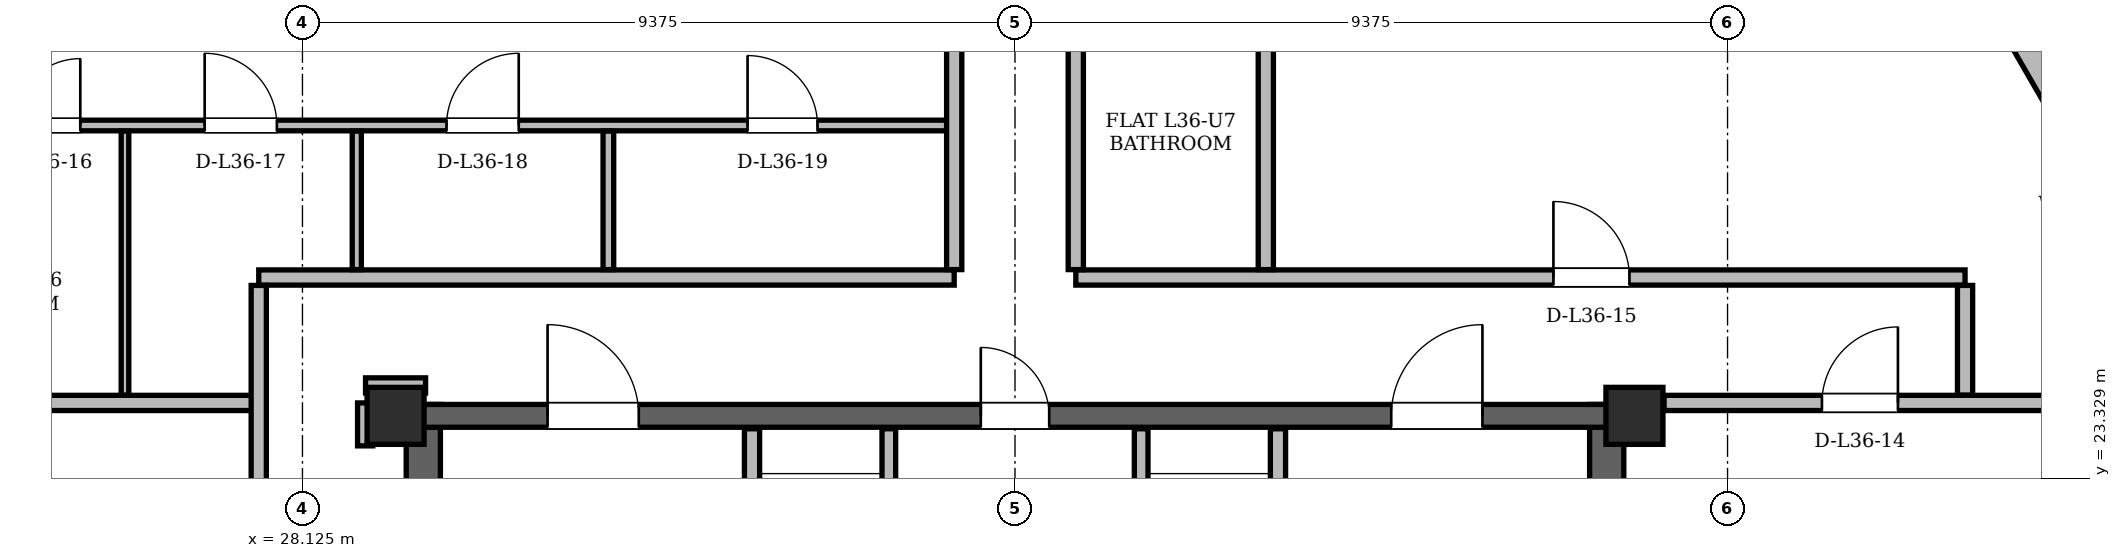
"""IFC4 building model, lengths in metres.
Left out: names, types, materials, properties, quantities, classifications, styles, units other than length and angle.
Written with IfcOpenShell. Run it as: python <this file> out.ifc"""

import sys

from ifc_helpers import new_model, si_unit, direction, frame, frame_2d, origin, origin_2d, place, context, subcontext, project, spatial, rectangle, hollow_rectangle, extrude, element, fill, save


model = new_model("IFC4")
c1 = context("Model", 3, precision=1e-05, world=origin(), true_north=direction((0.0, 1.0)))
c2 = subcontext(c1, "Body", "Model", "MODEL_VIEW")
j1 = project(units=[si_unit("LENGTHUNIT", "METRE"), si_unit("PLANEANGLEUNIT", "RADIAN")], contexts=[c1])
p1 = place(None, origin())
s1 = spatial("IfcSite", under=j1, at=p1, CompositionType="ELEMENT")
p2 = place(p1, origin())
s2 = spatial("IfcBuilding", under=s1, at=p2, CompositionType="ELEMENT")
p3 = place(p2, frame((0.0, 0.0, 138.6)))
s3 = spatial("IfcBuildingStorey", under=s2, at=p3, CompositionType="ELEMENT", Elevation=138.6)
for number, where, z_axis, x_axis in (
    (1, (45.65, 24.15, 0.0), (0.0, 0.0, 1.0), (1.0, 0.0, 0.0)),
    (2, (29.35, 24.15, 0.0), (0.0, 0.0, 1.0), (1.0, 0.0, 0.0)),
):
    element("IfcColumn", number, at=place(p3, frame(where, z_axis=z_axis, x_axis=x_axis)), inside=s3, PredefinedType="COLUMN", context=c2, shape_type="SweptSolid", body=[
        extrude(hollow_rectangle(XDim=0.75, YDim=0.75, WallThickness=0.06, at=origin_2d()), origin(), (0.0, 0.0, 1.0), 3.6),
    ])
for number, where, z_axis, x_axis in (
    (3, (29.715, 11.0, 0.0), (0.0, 0.0, 1.0), (0.0, 1.0, 0.0)),
    (4, (45.285, 11.0, 0.0), (0.0, 0.0, 1.0), (0.0, 1.0, 0.0)),
):
    element("IfcWall", number, at=place(p3, frame(where, z_axis=z_axis, x_axis=x_axis)), inside=s3, PredefinedType="SHEAR", context=c2, shape_type="SweptSolid", body=[
        extrude(rectangle(XDim=13.3, YDim=0.45, at=frame_2d((6.65, 0.0))), origin(), (0.0, 0.0, 1.0), 3.36),
    ])
p4 = place(p3, frame((29.65, 24.15, 0.0), z_axis=(0.0, 0.0, 1.0), x_axis=(1.0, 0.0, 0.0)))
e5 = element("IfcWall", 5, at=p4, inside=s3, PredefinedType="SHEAR", context=c2, shape_type="SweptSolid", body=[
    extrude(rectangle(XDim=15.7, YDim=0.3, at=frame_2d((7.85, 0.0))), origin(), (0.0, 0.0, 1.0), 3.36),
])
p5 = place(p4, frame((1.7, 0.0, 0.0)))
e6 = element("IfcOpeningElement", 6, at=p5, cuts=e5, PredefinedType="OPENING", context=c2, shape_type="SweptSolid", body=[
    extrude(rectangle(XDim=1.2, YDim=2.2, at=frame_2d((0.6, 1.1))), frame((0.0, 0.15, 0.0), z_axis=(0.0, -1.0, 0.0), x_axis=(1.0, 0.0, 0.0)), (0.0, 0.0, 1.0), 0.3),
])
p6 = place(p4, frame((12.8, 0.0, 0.0)))
e7 = element("IfcOpeningElement", 7, at=p6, cuts=e5, PredefinedType="OPENING", context=c2, shape_type="SweptSolid", body=[
    extrude(rectangle(XDim=1.2, YDim=2.2, at=frame_2d((0.6, 1.1))), frame((0.0, 0.15, 0.0), z_axis=(0.0, -1.0, 0.0), x_axis=(1.0, 0.0, 0.0)), (0.0, 0.0, 1.0), 0.3),
])
p7 = place(p4, frame((7.4, 0.0, 0.0)))
e8 = element("IfcOpeningElement", 8, at=p7, cuts=e5, PredefinedType="OPENING", context=c2, shape_type="SweptSolid", body=[
    extrude(rectangle(XDim=0.9, YDim=2.05, at=frame_2d((0.45, 1.025))), frame((0.0, 0.15, 0.0), z_axis=(0.0, -1.0, 0.0), x_axis=(1.0, 0.0, 0.0)), (0.0, 0.0, 1.0), 0.3),
])
p8 = place(p3, frame((60.155, 12.82, 0.0), z_axis=(0.0, 0.0, 1.0), x_axis=(-0.499998325337, 0.86602637065, 0.0)))
e9 = element("IfcWall", 9, at=p8, inside=s3, PredefinedType="SOLIDWALL", context=c2, shape_type="SweptSolid", body=[
    extrude(rectangle(XDim=35.264, YDim=0.34, at=frame_2d((17.632, 0.0))), origin(), (0.0, 0.0, 1.0), 2.58),
])
p9 = place(p8, frame((6.579, 0.0, 0.0)))
e10 = element("IfcOpeningElement", 10, at=p9, cuts=e9, PredefinedType="OPENING", context=c2, shape_type="SweptSolid", body=[
    extrude(rectangle(XDim=1.5, YDim=2.2, at=frame_2d((0.75, 1.1))), frame((0.0, 0.17, 0.0), z_axis=(0.0, -1.0, 0.0), x_axis=(1.0, 0.0, 0.0)), (0.0, 0.0, 1.0), 0.34),
])
p10 = place(p8, frame((25.73, 0.0, 0.0)))
e11 = element("IfcOpeningElement", 11, at=p10, cuts=e9, PredefinedType="OPENING", context=c2, shape_type="SweptSolid", body=[
    extrude(rectangle(XDim=1.5, YDim=2.2, at=frame_2d((0.75, 1.1))), frame((0.0, 0.17, 0.0), z_axis=(0.0, -1.0, 0.0), x_axis=(1.0, 0.0, 0.0)), (0.0, 0.0, 1.0), 0.34),
])
p11 = place(p8, frame((3.541, 0.0, 0.85)))
e12 = element("IfcOpeningElement", 12, at=p11, cuts=e9, PredefinedType="OPENING", context=c2, shape_type="SweptSolid", body=[
    extrude(rectangle(XDim=1.2, YDim=1.48, at=frame_2d((0.6, 0.74))), frame((0.0, 0.17, 0.0), z_axis=(0.0, -1.0, 0.0), x_axis=(1.0, 0.0, 0.0)), (0.0, 0.0, 1.0), 0.34),
])
p12 = place(p8, frame((11.719, 0.0, 0.85)))
e13 = element("IfcOpeningElement", 13, at=p12, cuts=e9, PredefinedType="OPENING", context=c2, shape_type="SweptSolid", body=[
    extrude(rectangle(XDim=1.2, YDim=1.48, at=frame_2d((0.6, 0.74))), frame((0.0, 0.17, 0.0), z_axis=(0.0, -1.0, 0.0), x_axis=(1.0, 0.0, 0.0)), (0.0, 0.0, 1.0), 0.34),
])
p13 = place(p8, frame((15.189, 0.0, 0.85)))
e14 = element("IfcOpeningElement", 14, at=p13, cuts=e9, PredefinedType="OPENING", context=c2, shape_type="SweptSolid", body=[
    extrude(rectangle(XDim=2.8, YDim=1.62, at=frame_2d((1.4, 0.81))), frame((0.0, 0.17, 0.0), z_axis=(0.0, -1.0, 0.0), x_axis=(1.0, 0.0, 0.0)), (0.0, 0.0, 1.0), 0.34),
])
p14 = place(p8, frame((32.147, 0.0, 0.85)))
e15 = element("IfcOpeningElement", 15, at=p14, cuts=e9, PredefinedType="OPENING", context=c2, shape_type="SweptSolid", body=[
    extrude(rectangle(XDim=2.0, YDim=1.62, at=frame_2d((1.0, 0.81))), frame((0.0, 0.17, 0.0), z_axis=(0.0, -1.0, 0.0), x_axis=(1.0, 0.0, 0.0)), (0.0, 0.0, 1.0), 0.34),
])
p15 = place(p3, frame((32.478, 43.36, 0.0), z_axis=(0.0, 0.0, 1.0), x_axis=(-0.499998325337, -0.86602637065, 0.0)))
e16 = element("IfcWall", 16, at=p15, inside=s3, PredefinedType="SOLIDWALL", context=c2, shape_type="SweptSolid", body=[
    extrude(rectangle(XDim=35.264, YDim=0.34, at=frame_2d((17.632, 0.0))), origin(), (0.0, 0.0, 1.0), 2.58),
])
p16 = place(p15, frame((6.579, 0.0, 0.0)))
e17 = element("IfcOpeningElement", 17, at=p16, cuts=e16, PredefinedType="OPENING", context=c2, shape_type="SweptSolid", body=[
    extrude(rectangle(XDim=1.5, YDim=2.2, at=frame_2d((0.75, 1.1))), frame((0.0, 0.17, 0.0), z_axis=(0.0, -1.0, 0.0), x_axis=(1.0, 0.0, 0.0)), (0.0, 0.0, 1.0), 0.34),
])
p17 = place(p15, frame((26.36, 0.0, 0.0)))
e18 = element("IfcOpeningElement", 18, at=p17, cuts=e16, PredefinedType="OPENING", context=c2, shape_type="SweptSolid", body=[
    extrude(rectangle(XDim=1.5, YDim=2.2, at=frame_2d((0.75, 1.1))), frame((0.0, 0.17, 0.0), z_axis=(0.0, -1.0, 0.0), x_axis=(1.0, 0.0, 0.0)), (0.0, 0.0, 1.0), 0.34),
])
p18 = place(p15, frame((22.175, 0.0, 0.85)))
e19 = element("IfcOpeningElement", 19, at=p18, cuts=e16, PredefinedType="OPENING", context=c2, shape_type="SweptSolid", body=[
    extrude(rectangle(XDim=1.2, YDim=1.48, at=frame_2d((0.6, 0.74))), frame((0.0, 0.17, 0.0), z_axis=(0.0, -1.0, 0.0), x_axis=(1.0, 0.0, 0.0)), (0.0, 0.0, 1.0), 0.34),
])
p19 = place(p15, frame((2.32, 0.0, 0.85)))
e20 = element("IfcOpeningElement", 20, at=p19, cuts=e16, PredefinedType="OPENING", context=c2, shape_type="SweptSolid", body=[
    extrude(rectangle(XDim=1.6, YDim=1.62, at=frame_2d((0.8, 0.81))), frame((0.0, 0.17, 0.0), z_axis=(0.0, -1.0, 0.0), x_axis=(1.0, 0.0, 0.0)), (0.0, 0.0, 1.0), 0.34),
])
p20 = place(p15, frame((12.967, 0.0, 0.85)))
e21 = element("IfcOpeningElement", 21, at=p20, cuts=e16, PredefinedType="OPENING", context=c2, shape_type="SweptSolid", body=[
    extrude(rectangle(XDim=3.0, YDim=1.62, at=frame_2d((1.5, 0.81))), frame((0.0, 0.17, 0.0), z_axis=(0.0, -1.0, 0.0), x_axis=(1.0, 0.0, 0.0)), (0.0, 0.0, 1.0), 0.34),
])
p21 = place(p15, frame((20.304, 0.0, 0.85)))
e22 = element("IfcOpeningElement", 22, at=p21, cuts=e16, PredefinedType="OPENING", context=c2, shape_type="SweptSolid", body=[
    extrude(rectangle(XDim=1.2, YDim=1.48, at=frame_2d((0.6, 0.74))), frame((0.0, 0.17, 0.0), z_axis=(0.0, -1.0, 0.0), x_axis=(1.0, 0.0, 0.0)), (0.0, 0.0, 1.0), 0.34),
])
p22 = place(p3, frame((34.04, 19.48, 0.0), z_axis=(0.0, 0.0, 1.0), x_axis=(0.0, 1.0, 0.0)))
e23 = element("IfcWall", 23, at=p22, inside=s3, PredefinedType="PARTITIONING", context=c2, shape_type="SweptSolid", body=[
    extrude(rectangle(XDim=4.5, YDim=0.2, at=frame_2d((2.25, 0.0))), origin(), (0.0, 0.0, 1.0), 2.4),
])
p23 = place(p22, frame((2.12, 0.0, 0.0)))
e24 = element("IfcOpeningElement", 24, at=p23, cuts=e23, PredefinedType="OPENING", context=c2, shape_type="SweptSolid", body=[
    extrude(rectangle(XDim=1.1, YDim=2.2, at=frame_2d((0.55, 1.1))), frame((0.0, 0.1, 0.0), z_axis=(0.0, -1.0, 0.0), x_axis=(1.0, 0.0, 0.0)), (0.0, 0.0, 1.0), 0.2),
])
p24 = place(p3, frame((35.84, 20.96, 0.0), z_axis=(0.0, 0.0, 1.0), x_axis=(0.0, 1.0, 0.0)))
e25 = element("IfcWall", 25, at=p24, inside=s3, PredefinedType="PARTITIONING", context=c2, shape_type="SweptSolid", body=[
    extrude(rectangle(XDim=3.02, YDim=0.18, at=frame_2d((1.51, 0.0))), origin(), (0.0, 0.0, 1.0), 2.4),
])
p25 = place(p3, frame((40.96, 19.48, 0.0), z_axis=(0.0, 0.0, 1.0), x_axis=(0.0, 1.0, 0.0)))
e26 = element("IfcWall", 26, at=p25, inside=s3, PredefinedType="PARTITIONING", context=c2, shape_type="SweptSolid", body=[
    extrude(rectangle(XDim=4.5, YDim=0.2, at=frame_2d((2.25, 0.0))), origin(), (0.0, 0.0, 1.0), 2.4),
])
p26 = place(p25, frame((2.12, 0.0, 0.0)))
e27 = element("IfcOpeningElement", 27, at=p26, cuts=e26, PredefinedType="OPENING", context=c2, shape_type="SweptSolid", body=[
    extrude(rectangle(XDim=1.1, YDim=2.2, at=frame_2d((0.55, 1.1))), frame((0.0, 0.1, 0.0), z_axis=(0.0, -1.0, 0.0), x_axis=(1.0, 0.0, 0.0)), (0.0, 0.0, 1.0), 0.2),
])
p27 = place(p3, frame((39.16, 20.96, 0.0), z_axis=(0.0, 0.0, 1.0), x_axis=(0.0, 1.0, 0.0)))
e28 = element("IfcWall", 28, at=p27, inside=s3, PredefinedType="PARTITIONING", context=c2, shape_type="SweptSolid", body=[
    extrude(rectangle(XDim=3.02, YDim=0.18, at=frame_2d((1.51, 0.0))), origin(), (0.0, 0.0, 1.0), 2.4),
])
p28 = place(p3, frame((21.686, 24.32, 0.0), z_axis=(0.0, 0.0, 1.0), x_axis=(1.0, 0.0, 0.0)))
e29 = element("IfcWall", 29, at=p28, inside=s3, PredefinedType="PARTITIONING", context=c2, shape_type="SweptSolid", body=[
    extrude(rectangle(XDim=5.864, YDim=0.2, at=frame_2d((2.932, 0.0))), origin(), (0.0, 0.0, 1.0), 3.36),
])
p29 = place(p3, frame((46.04, 24.32, 0.0), z_axis=(0.0, 0.0, 1.0), x_axis=(1.0, 0.0, 0.0)))
e30 = element("IfcWall", 30, at=p29, inside=s3, PredefinedType="PARTITIONING", context=c2, shape_type="SweptSolid", body=[
    extrude(rectangle(XDim=7.274, YDim=0.2, at=frame_2d((3.637, 0.0))), origin(), (0.0, 0.0, 1.0), 3.36),
])
p30 = place(p29, frame((2.077, 0.0, 0.0)))
e31 = element("IfcOpeningElement", 31, at=p30, cuts=e30, PredefinedType="OPENING", context=c2, shape_type="SweptSolid", body=[
    extrude(rectangle(XDim=1.0, YDim=2.18, at=frame_2d((0.5, 1.09))), frame((0.0, 0.1, 0.0), z_axis=(0.0, -1.0, 0.0), x_axis=(1.0, 0.0, 0.0)), (0.0, 0.0, 1.0), 0.2),
])
p31 = place(p3, frame((28.955, 24.55, 0.0), z_axis=(0.0, 0.0, 1.0), x_axis=(1.0, 0.0, 0.0)))
e32 = element("IfcWall", 32, at=p31, inside=s3, PredefinedType="PARTITIONING", context=c2, shape_type="SweptSolid", body=[
    extrude(rectangle(XDim=0.79, YDim=0.2, at=frame_2d((0.395, 0.0))), origin(), (0.0, 0.0, 1.0), 2.822),
])
p32 = place(p3, frame((27.55, 25.97, 0.0), z_axis=(0.0, 0.0, 1.0), x_axis=(1.0, 0.0, 0.0)))
e33 = element("IfcWall", 33, at=p32, inside=s3, PredefinedType="PARTITIONING", context=c2, shape_type="SweptSolid", body=[
    extrude(rectangle(XDim=9.15, YDim=0.2, at=frame_2d((4.575, 0.0))), origin(), (0.0, 0.0, 1.0), 2.822),
])
p33 = place(p3, frame((38.3, 25.97, 0.0), z_axis=(0.0, 0.0, 1.0), x_axis=(1.0, 0.0, 0.0)))
e34 = element("IfcWall", 34, at=p33, inside=s3, PredefinedType="PARTITIONING", context=c2, shape_type="SweptSolid", body=[
    extrude(rectangle(XDim=11.7, YDim=0.2, at=frame_2d((5.85, 0.0))), origin(), (0.0, 0.0, 1.0), 2.822),
])
p34 = place(p33, frame((6.284, 0.0, 0.0)))
e35 = element("IfcOpeningElement", 35, at=p34, cuts=e34, PredefinedType="OPENING", context=c2, shape_type="SweptSolid", body=[
    extrude(rectangle(XDim=1.0, YDim=2.18, at=frame_2d((0.5, 1.09))), frame((0.0, 0.1, 0.0), z_axis=(0.0, -1.0, 0.0), x_axis=(1.0, 0.0, 0.0)), (0.0, 0.0, 1.0), 0.2),
])
p35 = place(p3, frame((23.793, 27.97, 0.0), z_axis=(0.0, 0.0, 1.0), x_axis=(1.0, 0.0, 0.0)))
e36 = element("IfcWall", 36, at=p35, inside=s3, PredefinedType="PARTITIONING", context=c2, shape_type="SweptSolid", body=[
    extrude(rectangle(XDim=12.957, YDim=0.14, at=frame_2d((6.478, 0.0))), origin(), (0.0, 0.0, 1.0), 2.822),
])
p36 = place(p35, frame((0.529, 0.0, 0.0)))
e37 = element("IfcOpeningElement", 37, at=p36, cuts=e36, PredefinedType="OPENING", context=c2, shape_type="SweptSolid", body=[
    extrude(rectangle(XDim=0.88, YDim=2.08, at=frame_2d((0.44, 1.04))), frame((0.0, 0.07, 0.0), z_axis=(0.0, -1.0, 0.0), x_axis=(1.0, 0.0, 0.0)), (0.0, 0.0, 1.0), 0.14),
])
p37 = place(p35, frame((3.045, 0.0, 0.0)))
e38 = element("IfcOpeningElement", 38, at=p37, cuts=e36, PredefinedType="OPENING", context=c2, shape_type="SweptSolid", body=[
    extrude(rectangle(XDim=0.95, YDim=2.1, at=frame_2d((0.475, 1.05))), frame((0.0, 0.07, 0.0), z_axis=(0.0, -1.0, 0.0), x_axis=(1.0, 0.0, 0.0)), (0.0, 0.0, 1.0), 0.14),
])
p38 = place(p35, frame((6.227, 0.0, 0.0)))
e39 = element("IfcOpeningElement", 39, at=p38, cuts=e36, PredefinedType="OPENING", context=c2, shape_type="SweptSolid", body=[
    extrude(rectangle(XDim=0.95, YDim=2.1, at=frame_2d((0.475, 1.05))), frame((0.0, 0.07, 0.0), z_axis=(0.0, -1.0, 0.0), x_axis=(1.0, 0.0, 0.0)), (0.0, 0.0, 1.0), 0.14),
])
p39 = place(p35, frame((10.188, 0.0, 0.0)))
e40 = element("IfcOpeningElement", 40, at=p39, cuts=e36, PredefinedType="OPENING", context=c2, shape_type="SweptSolid", body=[
    extrude(rectangle(XDim=0.92, YDim=2.12, at=frame_2d((0.46, 1.06))), frame((0.0, 0.07, 0.0), z_axis=(0.0, -1.0, 0.0), x_axis=(1.0, 0.0, 0.0)), (0.0, 0.0, 1.0), 0.14),
])
p40 = place(p3, frame((25.79, 24.424, 0.0), z_axis=(0.0, 0.0, 1.0), x_axis=(0.0, 1.0, 0.0)))
e41 = element("IfcWall", 41, at=p40, inside=s3, PredefinedType="PARTITIONING", context=c2, shape_type="SweptSolid", body=[
    extrude(rectangle(XDim=3.472, YDim=0.1, at=frame_2d((1.736, 0.0))), origin(), (0.0, 0.0, 1.0), 3.36),
])
p41 = place(p3, frame((27.55, 18.554, 0.0), z_axis=(0.0, 0.0, 1.0), x_axis=(0.0, 1.0, 0.0)))
e42 = element("IfcWall", 42, at=p41, inside=s3, PredefinedType="PARTITIONING", context=c2, shape_type="SweptSolid", body=[
    extrude(rectangle(XDim=7.312, YDim=0.2, at=frame_2d((3.656, 0.0))), origin(), (0.0, 0.0, 1.0), 3.36),
])
p42 = place(p3, frame((28.84, 26.074, 0.0), z_axis=(0.0, 0.0, 1.0), x_axis=(0.0, 1.0, 0.0)))
e43 = element("IfcWall", 43, at=p42, inside=s3, PredefinedType="PARTITIONING", context=c2, shape_type="SweptSolid", body=[
    extrude(rectangle(XDim=1.822, YDim=0.12, at=frame_2d((0.911, 0.0))), origin(), (0.0, 0.0, 1.0), 3.36),
])
p43 = place(p3, frame((28.95, 23.755, 0.0), z_axis=(0.0, 0.0, 1.0), x_axis=(0.0, 1.0, 0.0)))
e44 = element("IfcWall", 44, at=p43, inside=s3, PredefinedType="PARTITIONING", context=c2, shape_type="SweptSolid", body=[
    extrude(rectangle(XDim=0.565, YDim=0.2, at=frame_2d((0.283, 0.0))), origin(), (0.0, 0.0, 1.0), 3.36),
])
p44 = place(p3, frame((32.15, 26.074, 0.0), z_axis=(0.0, 0.0, 1.0), x_axis=(0.0, 1.0, 0.0)))
e45 = element("IfcWall", 45, at=p44, inside=s3, PredefinedType="PARTITIONING", context=c2, shape_type="SweptSolid", body=[
    extrude(rectangle(XDim=1.822, YDim=0.14, at=frame_2d((0.911, 0.0))), origin(), (0.0, 0.0, 1.0), 3.36),
])
p45 = place(p3, frame((36.7, 26.074, 0.0), z_axis=(0.0, 0.0, 1.0), x_axis=(0.0, 1.0, 0.0)))
e46 = element("IfcWall", 46, at=p45, inside=s3, PredefinedType="PARTITIONING", context=c2, shape_type="SweptSolid", body=[
    extrude(rectangle(XDim=17.112, YDim=0.2, at=frame_2d((8.556, 0.0))), origin(), (0.0, 0.0, 1.0), 3.36),
])
p46 = place(p45, frame((7.042, 0.0, 0.0)))
e47 = element("IfcOpeningElement", 47, at=p46, cuts=e46, PredefinedType="OPENING", context=c2, shape_type="SweptSolid", body=[
    extrude(rectangle(XDim=1.0, YDim=2.18, at=frame_2d((0.5, 1.09))), frame((0.0, 0.1, 0.0), z_axis=(0.0, -1.0, 0.0), x_axis=(1.0, 0.0, 0.0)), (0.0, 0.0, 1.0), 0.2),
])
p47 = place(p3, frame((38.3, 26.074, 0.0), z_axis=(0.0, 0.0, 1.0), x_axis=(0.0, 1.0, 0.0)))
e48 = element("IfcWall", 48, at=p47, inside=s3, PredefinedType="PARTITIONING", context=c2, shape_type="SweptSolid", body=[
    extrude(rectangle(XDim=13.422, YDim=0.2, at=frame_2d((6.711, 0.0))), origin(), (0.0, 0.0, 1.0), 3.36),
])
p48 = place(p47, frame((8.678, 0.0, 0.0)))
e49 = element("IfcOpeningElement", 49, at=p48, cuts=e48, PredefinedType="OPENING", context=c2, shape_type="SweptSolid", body=[
    extrude(rectangle(XDim=1.0, YDim=2.18, at=frame_2d((0.5, 1.09))), frame((0.0, 0.1, 0.0), z_axis=(0.0, -1.0, 0.0), x_axis=(1.0, 0.0, 0.0)), (0.0, 0.0, 1.0), 0.2),
])
p49 = place(p3, frame((40.8, 26.074, 0.0), z_axis=(0.0, 0.0, 1.0), x_axis=(0.0, 1.0, 0.0)))
e50 = element("IfcWall", 50, at=p49, inside=s3, PredefinedType="PARTITIONING", context=c2, shape_type="SweptSolid", body=[
    extrude(rectangle(XDim=17.112, YDim=0.2, at=frame_2d((8.556, 0.0))), origin(), (0.0, 0.0, 1.0), 3.36),
])
p50 = place(p3, frame((50.0, 24.424, 0.0), z_axis=(0.0, 0.0, 1.0), x_axis=(0.0, 1.0, 0.0)))
e51 = element("IfcWall", 51, at=p50, inside=s3, PredefinedType="PARTITIONING", context=c2, shape_type="SweptSolid", body=[
    extrude(rectangle(XDim=1.442, YDim=0.2, at=frame_2d((0.721, 0.0))), origin(), (0.0, 0.0, 1.0), 3.36),
])
p51 = place(p5, origin())
e52 = element("IfcDoor", 52, at=p51, inside=s3, OperationType="SINGLE_SWING_LEFT", PredefinedType="DOOR", context=c2, shape_type="SweptSolid", body=[
    extrude(rectangle(XDim=1.2, YDim=2.2, at=frame_2d((0.6, 1.1))), frame((0.0, 0.025, 0.0), z_axis=(0.0, -1.0, 0.0), x_axis=(1.0, 0.0, 0.0)), (0.0, 0.0, 1.0), 0.05),
])
fill(e6, e52)
p52 = place(p6, origin())
e53 = element("IfcDoor", 53, at=p52, inside=s3, OperationType="SINGLE_SWING_RIGHT", PredefinedType="DOOR", context=c2, shape_type="SweptSolid", body=[
    extrude(rectangle(XDim=1.2, YDim=2.2, at=frame_2d((0.6, 1.1))), frame((0.0, 0.025, 0.0), z_axis=(0.0, -1.0, 0.0), x_axis=(1.0, 0.0, 0.0)), (0.0, 0.0, 1.0), 0.05),
])
fill(e7, e53)
p53 = place(p7, origin())
e54 = element("IfcDoor", 54, at=p53, inside=s3, OperationType="SINGLE_SWING_LEFT", PredefinedType="DOOR", context=c2, shape_type="SweptSolid", body=[
    extrude(rectangle(XDim=0.9, YDim=2.05, at=frame_2d((0.45, 1.025))), frame((0.0, 0.025, 0.0), z_axis=(0.0, -1.0, 0.0), x_axis=(1.0, 0.0, 0.0)), (0.0, 0.0, 1.0), 0.05),
])
fill(e8, e54)
p54 = place(p30, origin())
e55 = element("IfcDoor", 55, at=p54, inside=s3, OperationType="SINGLE_SWING_RIGHT", PredefinedType="DOOR", context=c2, shape_type="SweptSolid", body=[
    extrude(rectangle(XDim=1.0, YDim=2.18, at=frame_2d((0.5, 1.09))), frame((0.0, 0.025, 0.0), z_axis=(0.0, -1.0, 0.0), x_axis=(1.0, 0.0, 0.0)), (0.0, 0.0, 1.0), 0.05),
])
fill(e31, e55)
p55 = place(p34, origin())
e56 = element("IfcDoor", 56, at=p55, inside=s3, OperationType="SINGLE_SWING_LEFT", PredefinedType="DOOR", context=c2, shape_type="SweptSolid", body=[
    extrude(rectangle(XDim=1.0, YDim=2.18, at=frame_2d((0.5, 1.09))), frame((0.0, 0.025, 0.0), z_axis=(0.0, -1.0, 0.0), x_axis=(1.0, 0.0, 0.0)), (0.0, 0.0, 1.0), 0.05),
])
fill(e35, e56)
p56 = place(p36, origin())
e57 = element("IfcDoor", 57, at=p56, inside=s3, OperationType="SINGLE_SWING_RIGHT", PredefinedType="DOOR", context=c2, shape_type="SweptSolid", body=[
    extrude(rectangle(XDim=0.88, YDim=2.08, at=frame_2d((0.44, 1.04))), frame((0.0, 0.025, 0.0), z_axis=(0.0, -1.0, 0.0), x_axis=(1.0, 0.0, 0.0)), (0.0, 0.0, 1.0), 0.05),
])
fill(e37, e57)
p57 = place(p37, origin())
e58 = element("IfcDoor", 58, at=p57, inside=s3, OperationType="SINGLE_SWING_LEFT", PredefinedType="DOOR", context=c2, shape_type="SweptSolid", body=[
    extrude(rectangle(XDim=0.95, YDim=2.1, at=frame_2d((0.475, 1.05))), frame((0.0, 0.025, 0.0), z_axis=(0.0, -1.0, 0.0), x_axis=(1.0, 0.0, 0.0)), (0.0, 0.0, 1.0), 0.05),
])
fill(e38, e58)
p58 = place(p38, origin())
e59 = element("IfcDoor", 59, at=p58, inside=s3, OperationType="SINGLE_SWING_RIGHT", PredefinedType="DOOR", context=c2, shape_type="SweptSolid", body=[
    extrude(rectangle(XDim=0.95, YDim=2.1, at=frame_2d((0.475, 1.05))), frame((0.0, 0.025, 0.0), z_axis=(0.0, -1.0, 0.0), x_axis=(1.0, 0.0, 0.0)), (0.0, 0.0, 1.0), 0.05),
])
fill(e39, e59)
p59 = place(p39, origin())
e60 = element("IfcDoor", 60, at=p59, inside=s3, OperationType="SINGLE_SWING_LEFT", PredefinedType="DOOR", context=c2, shape_type="SweptSolid", body=[
    extrude(rectangle(XDim=0.92, YDim=2.12, at=frame_2d((0.46, 1.06))), frame((0.0, 0.025, 0.0), z_axis=(0.0, -1.0, 0.0), x_axis=(1.0, 0.0, 0.0)), (0.0, 0.0, 1.0), 0.05),
])
fill(e40, e60)
save(model, sys.argv[1])
